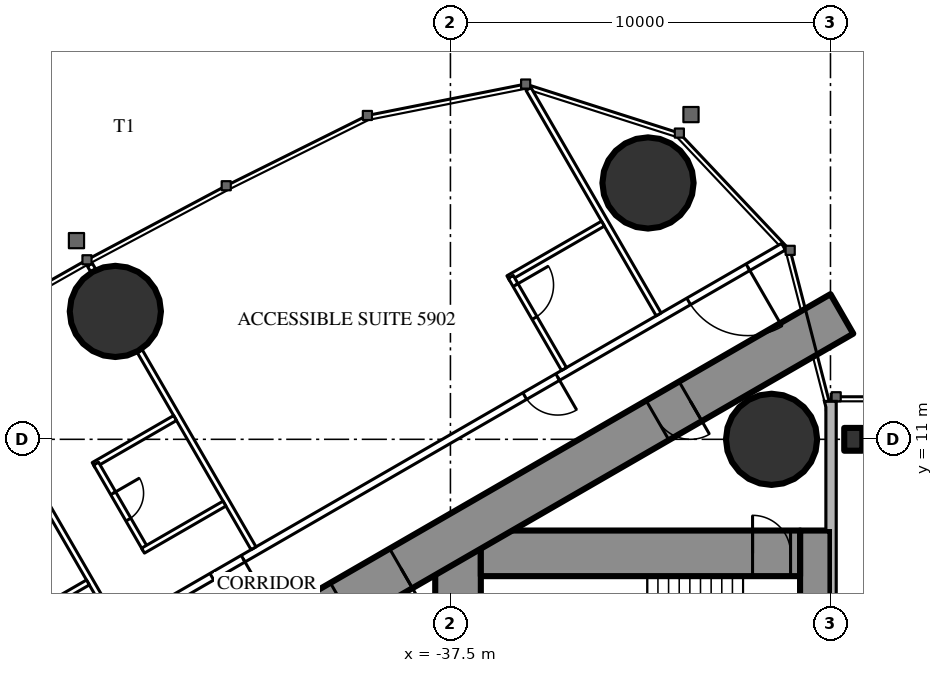
"""IFC4 building model, lengths in metres.
Left out: names, types, materials, properties, quantities, classifications, styles, units other than length and angle.
Written with IfcOpenShell. Run it as: python <this file> out.ifc"""

import sys

from ifc_helpers import new_model, si_unit, direction, frame, frame_2d, origin, origin_2d, place, context, subcontext, project, spatial, rectangle, circle, i_section, extrude, element, fill, save


model = new_model("IFC4")
c1 = context("Model", 3, precision=1e-05, world=origin(), true_north=direction((0.0, 1.0)))
c2 = subcontext(c1, "Body", "Model", "MODEL_VIEW")
j1 = project(units=[si_unit("LENGTHUNIT", "METRE"), si_unit("PLANEANGLEUNIT", "RADIAN")], contexts=[c1])
p1 = place(None, origin())
s1 = spatial("IfcSite", under=j1, at=p1, CompositionType="ELEMENT")
p2 = place(p1, origin())
s2 = spatial("IfcBuilding", under=s1, at=p2, CompositionType="ELEMENT")
p3 = place(p2, frame((0.0, 0.0, 222.5)))
s3 = spatial("IfcBuildingStorey", under=s2, at=p3, CompositionType="ELEMENT", Elevation=222.5)
for number, where, z_axis, x_axis in (
    (1, (-32.301, 17.745, 0.0), (0.0, 0.0, 1.0), (1.0, 0.0, 0.0)),
    (2, (-29.05, 11.0, 0.0), (0.0, 0.0, 1.0), (1.0, 0.0, 0.0)),
    (3, (-46.317, 14.365, 0.0), (0.0, 0.0, 1.0), (1.0, 0.0, 0.0)),
):
    element("IfcColumn", number, at=place(p3, frame(where, z_axis=z_axis, x_axis=x_axis)), inside=s3, PredefinedType="COLUMN", context=c2, shape_type="SweptSolid", body=[
        extrude(circle(Radius=1.2, at=origin_2d()), origin(), (0.0, 0.0, 1.0), 3.6),
    ])
p4 = place(p3, frame((-27.9, 8.6, 0.0), z_axis=(0.0, 0.0, 1.0), x_axis=(0.0, -1.0, 0.0)))
e4 = element("IfcWall", 4, at=p4, inside=s3, PredefinedType="SHEAR", context=c2, shape_type="SweptSolid", body=[
    extrude(rectangle(XDim=17.2, YDim=0.8, at=frame_2d((8.6, 0.0))), origin(), (0.0, 0.0, 1.0), 3.6),
])
p5 = place(p4, frame((6.95, 0.0, 0.0)))
e5 = element("IfcOpeningElement", 5, at=p5, cuts=e4, PredefinedType="OPENING", context=c2, shape_type="SweptSolid", body=[
    extrude(rectangle(XDim=0.9, YDim=2.2, at=frame_2d((0.45, 1.1))), frame((0.0, 0.41, 0.0), z_axis=(0.0, -1.0, 0.0), x_axis=(1.0, 0.0, 0.0)), (0.0, 0.0, 1.0), 0.82),
])
p6 = place(p3, frame((-37.3, 8.6, 0.0), z_axis=(0.0, 0.0, 1.0), x_axis=(0.0, -1.0, 0.0)))
e6 = element("IfcWall", 6, at=p6, inside=s3, PredefinedType="SHEAR", context=c2, shape_type="SweptSolid", body=[
    extrude(rectangle(XDim=17.2, YDim=1.2, at=frame_2d((8.6, 0.0))), origin(), (0.0, 0.0, 1.0), 3.6),
])
p7 = place(p6, frame((7.7, 0.0, 0.0)))
e7 = element("IfcOpeningElement", 7, at=p7, cuts=e6, PredefinedType="OPENING", context=c2, shape_type="SweptSolid", body=[
    extrude(rectangle(XDim=1.8, YDim=2.2, at=frame_2d((0.9, 1.1))), frame((0.0, 0.61, 0.0), z_axis=(0.0, -1.0, 0.0), x_axis=(1.0, 0.0, 0.0)), (0.0, 0.0, 1.0), 1.22),
])
p8 = place(p3, frame((-28.3, 8.0, 0.0), z_axis=(0.0, 0.0, 1.0), x_axis=(-1.0, 0.0, 0.0)))
e8 = element("IfcWall", 8, at=p8, inside=s3, PredefinedType="SHEAR", context=c2, shape_type="SweptSolid", body=[
    extrude(rectangle(XDim=8.4, YDim=1.2, at=frame_2d((4.2, 0.0))), origin(), (0.0, 0.0, 1.0), 3.6),
])
p9 = place(p8, frame((0.25, 0.0, 0.0)))
e9 = element("IfcOpeningElement", 9, at=p9, cuts=e8, PredefinedType="OPENING", context=c2, shape_type="SweptSolid", body=[
    extrude(rectangle(XDim=1.0, YDim=2.2, at=frame_2d((0.5, 1.1))), frame((0.0, 0.61, 0.0), z_axis=(0.0, -1.0, 0.0), x_axis=(1.0, 0.0, 0.0)), (0.0, 0.0, 1.0), 1.22),
])
p10 = place(p3, frame((-27.2, 14.3, 0.0), z_axis=(0.0, 0.0, 1.0), x_axis=(-0.866026593062, -0.499997940104, 0.0)))
e10 = element("IfcWall", 10, at=p10, inside=s3, PredefinedType="SHEAR", context=c2, shape_type="SweptSolid", body=[
    extrude(rectangle(XDim=28.946, YDim=1.2, at=frame_2d((14.473, 0.0))), origin(), (0.0, 0.0, 1.0), 3.6),
])
p11 = place(p10, frame((4.6, 0.0, 0.0)))
e11 = element("IfcOpeningElement", 11, at=p11, cuts=e10, PredefinedType="OPENING", context=c2, shape_type="SweptSolid", body=[
    extrude(rectangle(XDim=1.0, YDim=2.2, at=frame_2d((0.5, 1.1))), frame((0.0, 0.61, 0.0), z_axis=(0.0, -1.0, 0.0), x_axis=(1.0, 0.0, 0.0)), (0.0, 0.0, 1.0), 1.22),
])
p12 = place(p10, frame((13.395, 0.0, 0.0)))
e12 = element("IfcOpeningElement", 12, at=p12, cuts=e10, PredefinedType="OPENING", context=c2, shape_type="SweptSolid", body=[
    extrude(rectangle(XDim=1.8, YDim=2.2, at=frame_2d((0.9, 1.1))), frame((0.0, 0.61, 0.0), z_axis=(0.0, -1.0, 0.0), x_axis=(1.0, 0.0, 0.0)), (0.0, 0.0, 1.0), 1.22),
])
p13 = place(p3, frame((-26.9, 11.0, 0.0), z_axis=(0.0, 0.0, 1.0), x_axis=(1.0, 0.0, 0.0)))
e13 = element("IfcColumn", 13, at=p13, inside=s3, PredefinedType="COLUMN", context=c2, shape_type="SweptSolid", body=[
    extrude(i_section(OverallWidth=0.476, OverallDepth=0.6, WebThickness=0.1, FlangeThickness=0.14, FilletRadius=0.02, at=origin_2d()), origin(), (0.0, 0.0, 1.0), 3.6),
])
p14 = place(p3, frame((-28.737, 16.068, 0.0), z_axis=(0.0, 0.0, 1.0), x_axis=(-0.866026057212, -0.499998868229, 0.0)))
e14 = element("IfcWall", 14, at=p14, inside=s3, PredefinedType="PARTITIONING", context=c2, shape_type="SweptSolid", body=[
    extrude(rectangle(XDim=32.137, YDim=0.2, at=frame_2d((16.068, 0.0))), origin(), (0.0, 0.0, 1.0), 3.35),
])
p15 = place(p14, frame((1.08, 0.0, 0.0)))
e15 = element("IfcOpeningElement", 15, at=p15, cuts=e14, PredefinedType="OPENING", context=c2, shape_type="SweptSolid", body=[
    extrude(rectangle(XDim=1.8, YDim=2.03, at=frame_2d((0.9, 1.015))), frame((0.0, 0.11, 0.0), z_axis=(0.0, -1.0, 0.0), x_axis=(1.0, 0.0, 0.0)), (0.0, 0.0, 1.0), 0.22),
])
p16 = place(p14, frame((6.86, 0.0, 0.0)))
e16 = element("IfcOpeningElement", 16, at=p16, cuts=e14, PredefinedType="OPENING", context=c2, shape_type="SweptSolid", body=[
    extrude(rectangle(XDim=1.0, YDim=2.2, at=frame_2d((0.5, 1.1))), frame((0.0, 0.11, 0.0), z_axis=(0.0, -1.0, 0.0), x_axis=(1.0, 0.0, 0.0)), (0.0, 0.0, 1.0), 0.22),
])
p17 = place(p14, frame((16.418, 0.0, 0.0)))
e17 = element("IfcOpeningElement", 17, at=p17, cuts=e14, PredefinedType="OPENING", context=c2, shape_type="SweptSolid", body=[
    extrude(rectangle(XDim=0.95, YDim=2.2, at=frame_2d((0.475, 1.1))), frame((0.0, 0.11, 0.0), z_axis=(0.0, -1.0, 0.0), x_axis=(1.0, 0.0, 0.0)), (0.0, 0.0, 1.0), 0.22),
])
p18 = place(p14, frame((20.567, 0.0, 0.0)))
e18 = element("IfcOpeningElement", 18, at=p18, cuts=e14, PredefinedType="OPENING", context=c2, shape_type="SweptSolid", body=[
    extrude(rectangle(XDim=0.95, YDim=2.2, at=frame_2d((0.475, 1.1))), frame((0.0, 0.11, 0.0), z_axis=(0.0, -1.0, 0.0), x_axis=(1.0, 0.0, 0.0)), (0.0, 0.0, 1.0), 0.22),
])
p19 = place(p14, frame((27.065, 0.0, 0.0)))
e19 = element("IfcOpeningElement", 19, at=p19, cuts=e14, PredefinedType="OPENING", context=c2, shape_type="SweptSolid", body=[
    extrude(rectangle(XDim=0.95, YDim=2.2, at=frame_2d((0.475, 1.1))), frame((0.0, 0.11, 0.0), z_axis=(0.0, -1.0, 0.0), x_axis=(1.0, 0.0, 0.0)), (0.0, 0.0, 1.0), 0.22),
])
p20 = place(p3, frame((-32.022, 14.287, 0.0), z_axis=(0.0, 0.0, 1.0), x_axis=(-0.50000019414, 0.866025291697, 0.0)))
e20 = element("IfcWall", 20, at=p20, inside=s3, PredefinedType="PARTITIONING", context=c2, shape_type="SweptSolid", body=[
    extrude(rectangle(XDim=6.848, YDim=0.15, at=frame_2d((3.424, 0.0))), origin(), (0.0, 0.0, 1.0), 3.35),
])
p21 = place(p3, frame((-42.68, 8.134, 0.0), z_axis=(0.0, 0.0, 1.0), x_axis=(-0.499984479505, 0.866034364361, 0.0)))
e21 = element("IfcWall", 21, at=p21, inside=s3, PredefinedType="PARTITIONING", context=c2, shape_type="SweptSolid", body=[
    extrude(rectangle(XDim=5.995, YDim=0.15, at=frame_2d((2.998, 0.0))), origin(), (0.0, 0.0, 1.0), 2.45),
])
p22 = place(p3, frame((-46.898, 15.439, 0.0), z_axis=(0.0, 0.0, 1.0), x_axis=(-0.500232303069, 0.865891241997, 0.0)))
e22 = element("IfcWall", 22, at=p22, inside=s3, PredefinedType="PARTITIONING", context=c2, shape_type="SweptSolid", body=[
    extrude(rectangle(XDim=0.18, YDim=0.15, at=frame_2d((0.09, 0.0))), origin(), (0.0, 0.0, 1.0), 2.45),
])
p23 = place(p3, frame((-46.274, 6.059, 0.0), z_axis=(0.0, 0.0, 1.0), x_axis=(-0.500020471368, 0.866013584312, 0.0)))
e23 = element("IfcWall", 23, at=p23, inside=s3, PredefinedType="PARTITIONING", context=c2, shape_type="SweptSolid", body=[
    extrude(rectangle(XDim=6.028, YDim=0.15, at=frame_2d((3.014, 0.0))), origin(), (0.0, 0.0, 1.0), 2.45),
])
p24 = place(p3, frame((-33.487, 16.675, 0.0), z_axis=(0.0, 0.0, 1.0), x_axis=(-0.866039941686, -0.499974818771, 0.0)))
e24 = element("IfcWall", 24, at=p24, inside=s3, PredefinedType="PARTITIONING", context=c2, shape_type="SweptSolid", body=[
    extrude(rectangle(XDim=2.875, YDim=0.15, at=frame_2d((1.438, 0.0))), origin(), (0.0, 0.0, 1.0), 3.35),
])
p25 = place(p3, frame((-34.511, 12.85, 0.0), z_axis=(0.0, 0.0, 1.0), x_axis=(-0.500011755427, 0.866018616679, 0.0)))
e25 = element("IfcWall", 25, at=p25, inside=s3, PredefinedType="PARTITIONING", context=c2, shape_type="SweptSolid", body=[
    extrude(rectangle(XDim=2.8, YDim=0.15, at=frame_2d((1.4, 0.0))), origin(), (0.0, 0.0, 1.0), 3.35),
])
p26 = place(p25, frame((1.55, 0.0, 0.0)))
e26 = element("IfcOpeningElement", 26, at=p26, cuts=e25, PredefinedType="OPENING", context=c2, shape_type="SweptSolid", body=[
    extrude(rectangle(XDim=1.0, YDim=2.2, at=frame_2d((0.5, 1.1))), frame((0.0, 0.085, 0.0), z_axis=(0.0, -1.0, 0.0), x_axis=(1.0, 0.0, 0.0)), (0.0, 0.0, 1.0), 0.17),
])
p27 = place(p3, frame((-44.745, 11.56, 0.0), z_axis=(0.0, 0.0, 1.0), x_axis=(-0.866006523861, -0.500032699561, 0.0)))
e27 = element("IfcWall", 27, at=p27, inside=s3, PredefinedType="PARTITIONING", context=c2, shape_type="SweptSolid", body=[
    extrude(rectangle(XDim=2.475, YDim=0.15, at=frame_2d((1.237, 0.0))), origin(), (0.0, 0.0, 1.0), 3.35),
])
p28 = place(p3, frame((-45.524, 8.109, 0.0), z_axis=(0.0, 0.0, 1.0), x_axis=(-0.49997716683, 0.86603858612, 0.0)))
e28 = element("IfcWall", 28, at=p28, inside=s3, PredefinedType="PARTITIONING", context=c2, shape_type="SweptSolid", body=[
    extrude(rectangle(XDim=2.6, YDim=0.15, at=frame_2d((1.3, 0.0))), origin(), (0.0, 0.0, 1.0), 3.35),
])
p29 = place(p28, frame((0.9, 0.0, 0.0)))
e29 = element("IfcOpeningElement", 29, at=p29, cuts=e28, PredefinedType="OPENING", context=c2, shape_type="SweptSolid", body=[
    extrude(rectangle(XDim=0.8, YDim=2.2, at=frame_2d((0.4, 1.1))), frame((0.0, 0.085, 0.0), z_axis=(0.0, -1.0, 0.0), x_axis=(1.0, 0.0, 0.0)), (0.0, 0.0, 1.0), 0.17),
])
for number, where, z_axis, x_axis in (
    (30, (-43.445, 9.309, 0.0), (0.0, 0.0, 1.0), (-0.866, -0.5, 0.0)),
    (31, (-47.039, 7.234, 0.0), (0.0, 0.0, 1.0), (-0.866, -0.5, 0.0)),
):
    element("IfcWall", number, at=place(p3, frame(where, z_axis=z_axis, x_axis=x_axis)), inside=s3, PredefinedType="PARTITIONING", context=c2, shape_type="SweptSolid", body=[
        extrude(rectangle(XDim=2.475, YDim=0.15, at=frame_2d((1.238, 0.0))), origin(), (0.0, 0.0, 1.0), 3.35),
    ])
p30 = place(p15, origin())
e32 = element("IfcDoor", 32, at=p30, inside=s3, OperationType="DOUBLE_DOOR_SINGLE_SWING", PredefinedType="DOOR", context=c2, shape_type="SweptSolid", body=[
    extrude(rectangle(XDim=1.8, YDim=2.03, at=frame_2d((0.9, 1.015))), frame((0.0, 0.025, 0.0), z_axis=(0.0, -1.0, 0.0), x_axis=(1.0, 0.0, 0.0)), (0.0, 0.0, 1.0), 0.05),
])
fill(e15, e32)
p31 = place(p26, origin())
e33 = element("IfcDoor", 33, at=p31, inside=s3, OperationType="SINGLE_SWING_RIGHT", PredefinedType="DOOR", context=c2, shape_type="SweptSolid", body=[
    extrude(rectangle(XDim=1.0, YDim=2.2, at=frame_2d((0.5, 1.1))), frame((0.0, 0.025, 0.0), z_axis=(0.0, -1.0, 0.0), x_axis=(1.0, 0.0, 0.0)), (0.0, 0.0, 1.0), 0.05),
])
fill(e26, e33)
p32 = place(p16, origin())
e34 = element("IfcDoor", 34, at=p32, inside=s3, OperationType="SINGLE_SWING_LEFT", PredefinedType="DOOR", context=c2, shape_type="SweptSolid", body=[
    extrude(rectangle(XDim=1.0, YDim=2.2, at=frame_2d((0.5, 1.1))), frame((0.0, 0.025, 0.0), z_axis=(0.0, -1.0, 0.0), x_axis=(1.0, 0.0, 0.0)), (0.0, 0.0, 1.0), 0.05),
])
fill(e16, e34)
p33 = place(p29, origin())
e35 = element("IfcDoor", 35, at=p33, inside=s3, OperationType="SINGLE_SWING_RIGHT", PredefinedType="DOOR", context=c2, shape_type="SweptSolid", body=[
    extrude(rectangle(XDim=0.8, YDim=2.2, at=frame_2d((0.4, 1.1))), frame((0.0, 0.025, 0.0), z_axis=(0.0, -1.0, 0.0), x_axis=(1.0, 0.0, 0.0)), (0.0, 0.0, 1.0), 0.05),
])
fill(e29, e35)
p34 = place(p17, origin())
e36 = element("IfcDoor", 36, at=p34, inside=s3, OperationType="SINGLE_SWING_LEFT", PredefinedType="DOOR", context=c2, shape_type="SweptSolid", body=[
    extrude(rectangle(XDim=0.95, YDim=2.2, at=frame_2d((0.475, 1.1))), frame((0.0, 0.025, 0.0), z_axis=(0.0, -1.0, 0.0), x_axis=(1.0, 0.0, 0.0)), (0.0, 0.0, 1.0), 0.05),
])
fill(e17, e36)
p35 = place(p11, origin())
e37 = element("IfcDoor", 37, at=p35, inside=s3, OperationType="SINGLE_SWING_LEFT", PredefinedType="DOOR", context=c2, shape_type="SweptSolid", body=[
    extrude(rectangle(XDim=1.0, YDim=2.2, at=frame_2d((0.5, 1.1))), frame((0.0, 0.025, 0.0), z_axis=(0.0, -1.0, 0.0), x_axis=(1.0, 0.0, 0.0)), (0.0, 0.0, 1.0), 0.05),
])
fill(e11, e37)
p36 = place(p12, origin())
e38 = element("IfcDoor", 38, at=p36, inside=s3, OperationType="DOUBLE_DOOR_SINGLE_SWING", PredefinedType="DOOR", context=c2, shape_type="SweptSolid", body=[
    extrude(rectangle(XDim=1.8, YDim=2.2, at=frame_2d((0.9, 1.1))), frame((0.0, 0.025, 0.0), z_axis=(0.0, -1.0, 0.0), x_axis=(1.0, 0.0, 0.0)), (0.0, 0.0, 1.0), 0.05),
])
fill(e12, e38)
p37 = place(p9, origin())
e39 = element("IfcDoor", 39, at=p37, inside=s3, OperationType="SINGLE_SWING_RIGHT", PredefinedType="DOOR", context=c2, shape_type="SweptSolid", body=[
    extrude(rectangle(XDim=1.0, YDim=2.2, at=frame_2d((0.5, 1.1))), frame((0.0, 0.025, 0.0), z_axis=(0.0, -1.0, 0.0), x_axis=(1.0, 0.0, 0.0)), (0.0, 0.0, 1.0), 0.05),
])
fill(e9, e39)
save(model, sys.argv[1])
